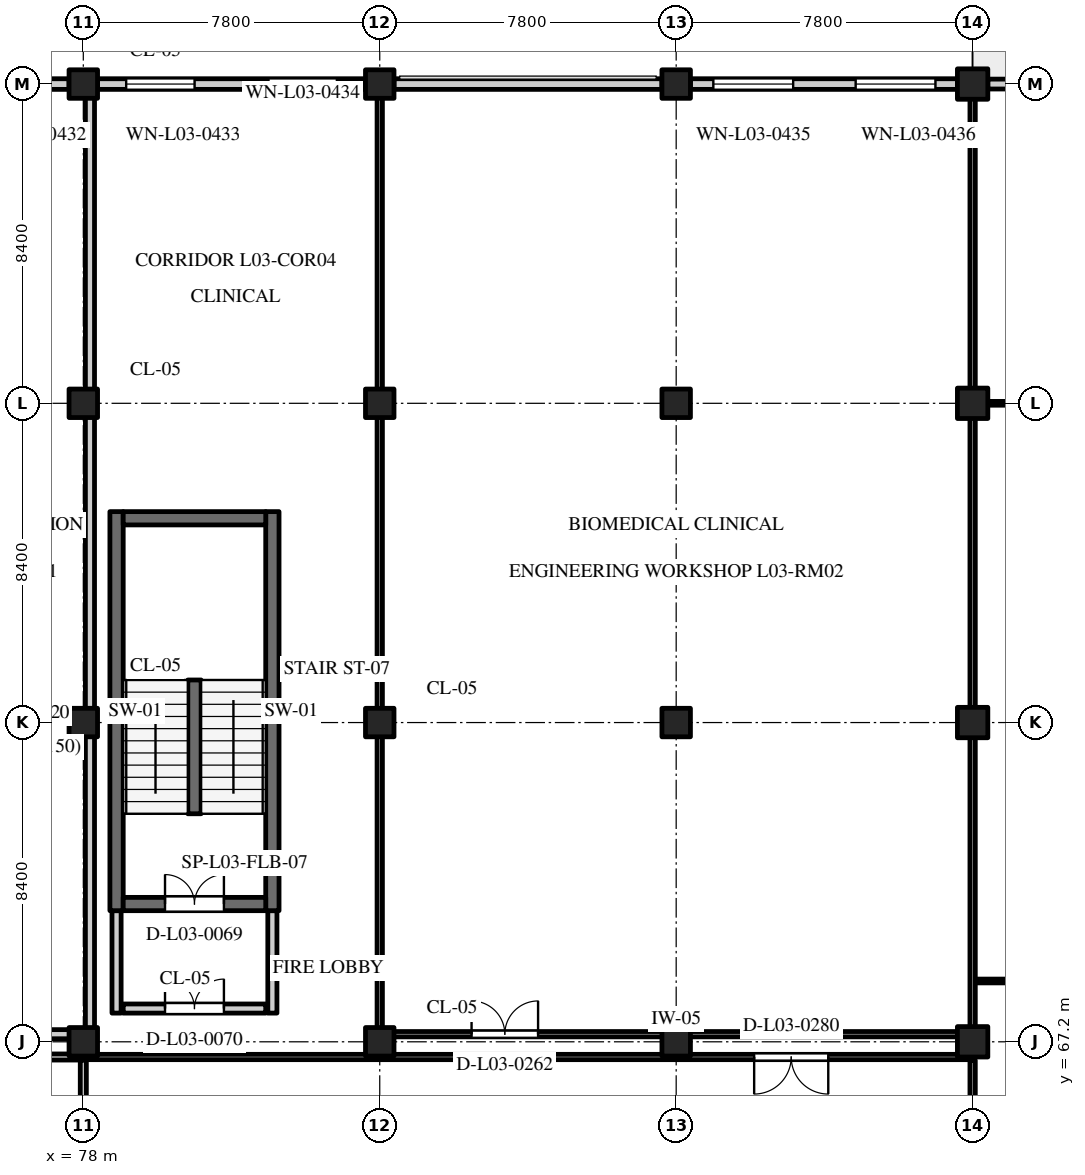
"""IFC4 building model, lengths in metres.
Left out: names, types, materials, properties, quantities, classifications, styles, units other than length and angle.
Written with IfcOpenShell. Run it as: python <this file> out.ifc"""

import sys

from ifc_helpers import new_model, si_unit, direction, frame, frame_2d, origin, origin_2d, place, context, subcontext, project, spatial, rectangle, extrude, element, fill, save


model = new_model("IFC4")
c1 = context("Model", 3, precision=1e-05, world=origin(), true_north=direction((0.0, 1.0)))
c2 = subcontext(c1, "Body", "Model", "MODEL_VIEW")
j1 = project(units=[si_unit("LENGTHUNIT", "METRE"), si_unit("PLANEANGLEUNIT", "RADIAN")], contexts=[c1])
p1 = place(None, origin())
s1 = spatial("IfcSite", under=j1, at=p1, CompositionType="ELEMENT")
p2 = place(p1, origin())
s2 = spatial("IfcBuilding", under=s1, at=p2, CompositionType="ELEMENT")
p3 = place(p2, frame((0.0, 0.0, 14.4)))
s3 = spatial("IfcBuildingStorey", under=s2, at=p3, CompositionType="ELEMENT", Elevation=14.4)
for number, where, z_axis, x_axis in (
    (1, (78.0, 67.2, 0.0), (0.0, 0.0, 1.0), (1.0, 0.0, 0.0)),
    (2, (78.0, 75.6, 0.0), (0.0, 0.0, 1.0), (1.0, 0.0, 0.0)),
    (3, (78.0, 84.0, 0.0), (0.0, 0.0, 1.0), (1.0, 0.0, 0.0)),
    (4, (78.0, 92.4, 0.0), (0.0, 0.0, 1.0), (1.0, 0.0, 0.0)),
    (5, (85.8, 67.2, 0.0), (0.0, 0.0, 1.0), (1.0, 0.0, 0.0)),
    (6, (85.8, 75.6, 0.0), (0.0, 0.0, 1.0), (1.0, 0.0, 0.0)),
    (7, (85.8, 84.0, 0.0), (0.0, 0.0, 1.0), (1.0, 0.0, 0.0)),
    (8, (85.8, 92.4, 0.0), (0.0, 0.0, 1.0), (1.0, 0.0, 0.0)),
    (9, (93.6, 67.2, 0.0), (0.0, 0.0, 1.0), (1.0, 0.0, 0.0)),
    (10, (93.6, 75.6, 0.0), (0.0, 0.0, 1.0), (1.0, 0.0, 0.0)),
    (11, (93.6, 84.0, 0.0), (0.0, 0.0, 1.0), (1.0, 0.0, 0.0)),
    (12, (93.6, 92.4, 0.0), (0.0, 0.0, 1.0), (1.0, 0.0, 0.0)),
):
    element("IfcColumn", number, at=place(p3, frame(where, z_axis=z_axis, x_axis=x_axis)), inside=s3, PredefinedType="COLUMN", context=c2, shape_type="SweptSolid", body=[
        extrude(rectangle(XDim=0.75, YDim=0.75, at=origin_2d()), origin(), (0.0, 0.0, 1.0), 3.6),
    ])
for number, where, z_axis, x_axis in (
    (13, (101.4, 67.2, 0.0), (0.0, 0.0, 1.0), (1.0, 0.0, 0.0)),
    (14, (101.4, 75.6, 0.0), (0.0, 0.0, 1.0), (1.0, 0.0, 0.0)),
    (15, (101.4, 84.0, 0.0), (0.0, 0.0, 1.0), (1.0, 0.0, 0.0)),
    (16, (101.4, 92.4, 0.0), (0.0, 0.0, 1.0), (1.0, 0.0, 0.0)),
):
    element("IfcColumn", number, at=place(p3, frame(where, z_axis=z_axis, x_axis=x_axis)), inside=s3, PredefinedType="COLUMN", context=c2, shape_type="SweptSolid", body=[
        extrude(rectangle(XDim=0.8, YDim=0.8, at=origin_2d()), origin(), (0.0, 0.0, 1.0), 3.6),
    ])
p4 = place(p3, frame((70.575, 92.4, 0.0), z_axis=(0.0, 0.0, 1.0), x_axis=(1.0, 0.0, 0.0)))
e17 = element("IfcWall", 17, at=p4, inside=s3, PredefinedType="STANDARD", context=c2, shape_type="SweptSolid", body=[
    extrude(rectangle(XDim=7.05, YDim=0.28, at=frame_2d((3.525, 0.0))), origin(), (0.0, 0.0, 1.0), 2.72),
])
p5 = place(p4, frame((0.753, 0.0, 0.8)))
e18 = element("IfcOpeningElement", 18, at=p5, cuts=e17, PredefinedType="OPENING", context=c2, shape_type="SweptSolid", body=[
    extrude(rectangle(XDim=1.8, YDim=1.65, at=frame_2d((0.9, 0.825))), frame((0.0, 0.152, 0.0), z_axis=(0.0, -1.0, 0.0), x_axis=(1.0, 0.0, 0.0)), (0.0, 0.0, 1.0), 0.304),
])
p6 = place(p4, frame((4.497, 0.0, 0.8)))
e19 = element("IfcOpeningElement", 19, at=p6, cuts=e17, PredefinedType="OPENING", context=c2, shape_type="SweptSolid", body=[
    extrude(rectangle(XDim=1.8, YDim=1.65, at=frame_2d((0.9, 0.825))), frame((0.0, 0.152, 0.0), z_axis=(0.0, -1.0, 0.0), x_axis=(1.0, 0.0, 0.0)), (0.0, 0.0, 1.0), 0.304),
])
p7 = place(p3, frame((78.375, 92.4, 0.0), z_axis=(0.0, 0.0, 1.0), x_axis=(1.0, 0.0, 0.0)))
e20 = element("IfcWall", 20, at=p7, inside=s3, PredefinedType="STANDARD", context=c2, shape_type="SweptSolid", body=[
    extrude(rectangle(XDim=7.05, YDim=0.28, at=frame_2d((3.525, 0.0))), origin(), (0.0, 0.0, 1.0), 2.72),
])
p8 = place(p7, frame((0.753, 0.0, 0.8)))
e21 = element("IfcOpeningElement", 21, at=p8, cuts=e20, PredefinedType="OPENING", context=c2, shape_type="SweptSolid", body=[
    extrude(rectangle(XDim=1.8, YDim=1.55, at=frame_2d((0.9, 0.775))), frame((0.0, 0.152, 0.0), z_axis=(0.0, -1.0, 0.0), x_axis=(1.0, 0.0, 0.0)), (0.0, 0.0, 1.0), 0.304),
])
p9 = place(p7, frame((4.497, 0.0, 0.8)))
e22 = element("IfcOpeningElement", 22, at=p9, cuts=e20, PredefinedType="OPENING", context=c2, shape_type="SweptSolid", body=[
    extrude(rectangle(XDim=1.8, YDim=1.55, at=frame_2d((0.9, 0.775))), frame((0.0, 0.152, 0.0), z_axis=(0.0, -1.0, 0.0), x_axis=(1.0, 0.0, 0.0)), (0.0, 0.0, 1.0), 0.304),
])
p10 = place(p3, frame((86.175, 92.4, 0.0), z_axis=(0.0, 0.0, 1.0), x_axis=(1.0, 0.0, 0.0)))
e23 = element("IfcWall", 23, at=p10, inside=s3, PredefinedType="STANDARD", context=c2, shape_type="SweptSolid", body=[
    extrude(rectangle(XDim=7.05, YDim=0.28, at=frame_2d((3.525, 0.0))), origin(), (0.0, 0.0, 1.0), 2.72),
])
p11 = place(p3, frame((93.975, 92.4, 0.0), z_axis=(0.0, 0.0, 1.0), x_axis=(1.0, 0.0, 0.0)))
e24 = element("IfcWall", 24, at=p11, inside=s3, PredefinedType="STANDARD", context=c2, shape_type="SweptSolid", body=[
    extrude(rectangle(XDim=7.025, YDim=0.28, at=frame_2d((3.512, 0.0))), origin(), (0.0, 0.0, 1.0), 2.72),
])
p12 = place(p11, frame((0.603, 0.0, 0.8)))
e25 = element("IfcOpeningElement", 25, at=p12, cuts=e24, PredefinedType="OPENING", context=c2, shape_type="SweptSolid", body=[
    extrude(rectangle(XDim=2.1, YDim=1.65, at=frame_2d((1.05, 0.825))), frame((0.0, 0.152, 0.0), z_axis=(0.0, -1.0, 0.0), x_axis=(1.0, 0.0, 0.0)), (0.0, 0.0, 1.0), 0.304),
])
p13 = place(p11, frame((4.347, 0.0, 0.8)))
e26 = element("IfcOpeningElement", 26, at=p13, cuts=e24, PredefinedType="OPENING", context=c2, shape_type="SweptSolid", body=[
    extrude(rectangle(XDim=2.1, YDim=1.65, at=frame_2d((1.05, 0.825))), frame((0.0, 0.152, 0.0), z_axis=(0.0, -1.0, 0.0), x_axis=(1.0, 0.0, 0.0)), (0.0, 0.0, 1.0), 0.304),
])
p14 = place(p3, frame((101.8, 92.4, 0.0), z_axis=(0.0, 0.0, 1.0), x_axis=(1.0, 0.0, 0.0)))
e27 = element("IfcWall", 27, at=p14, inside=s3, PredefinedType="STANDARD", context=c2, shape_type="SweptSolid", body=[
    extrude(rectangle(XDim=7.0, YDim=0.26, at=frame_2d((3.5, 0.0))), origin(), (0.0, 0.0, 1.0), 2.72),
])
p15 = place(p14, frame((0.578, 0.0, 0.8)))
e28 = element("IfcOpeningElement", 28, at=p15, cuts=e27, PredefinedType="OPENING", context=c2, shape_type="SweptSolid", body=[
    extrude(rectangle(XDim=2.1, YDim=1.55, at=frame_2d((1.05, 0.775))), frame((0.0, 0.142, 0.0), z_axis=(0.0, -1.0, 0.0), x_axis=(1.0, 0.0, 0.0)), (0.0, 0.0, 1.0), 0.284),
])
p16 = place(p14, frame((4.322, 0.0, 0.8)))
e29 = element("IfcOpeningElement", 29, at=p16, cuts=e27, PredefinedType="OPENING", context=c2, shape_type="SweptSolid", body=[
    extrude(rectangle(XDim=2.1, YDim=1.55, at=frame_2d((1.05, 0.775))), frame((0.0, 0.142, 0.0), z_axis=(0.0, -1.0, 0.0), x_axis=(1.0, 0.0, 0.0)), (0.0, 0.0, 1.0), 0.284),
])
for number, where, z_axis, x_axis in (
    (30, (78.875, 70.65, 0.0), (0.0, 0.0, 1.0), (0.0, 1.0, 0.0)),
    (31, (82.975, 70.65, 0.0), (0.0, 0.0, 1.0), (0.0, 1.0, 0.0)),
):
    element("IfcWall", number, at=place(p3, frame(where, z_axis=z_axis, x_axis=x_axis)), inside=s3, PredefinedType="SHEAR", context=c2, shape_type="SweptSolid", body=[
        extrude(rectangle(XDim=10.5, YDim=0.35, at=frame_2d((5.25, 0.0))), origin(), (0.0, 0.0, 1.0), 3.6),
    ])
p17 = place(p3, frame((79.05, 80.975, 0.0), z_axis=(0.0, 0.0, 1.0), x_axis=(1.0, 0.0, 0.0)))
e32 = element("IfcWall", 32, at=p17, inside=s3, PredefinedType="SHEAR", context=c2, shape_type="SweptSolid", body=[
    extrude(rectangle(XDim=3.75, YDim=0.35, at=frame_2d((1.875, 0.0))), origin(), (0.0, 0.0, 1.0), 3.6),
])
p18 = place(p3, frame((79.05, 70.825, 0.0), z_axis=(0.0, 0.0, 1.0), x_axis=(1.0, 0.0, 0.0)))
e33 = element("IfcWall", 33, at=p18, inside=s3, PredefinedType="SHEAR", context=c2, shape_type="SweptSolid", body=[
    extrude(rectangle(XDim=3.75, YDim=0.35, at=frame_2d((1.875, 0.0))), origin(), (0.0, 0.0, 1.0), 3.27),
])
p19 = place(p18, frame((1.1, 0.0, 0.0)))
e34 = element("IfcOpeningElement", 34, at=p19, cuts=e33, PredefinedType="OPENING", context=c2, shape_type="SweptSolid", body=[
    extrude(rectangle(XDim=1.55, YDim=2.25, at=frame_2d((0.775, 1.125))), frame((0.0, 0.187, 0.0), z_axis=(0.0, -1.0, 0.0), x_axis=(1.0, 0.0, 0.0)), (0.0, 0.0, 1.0), 0.374),
])
for number, where, z_axis, x_axis in (
    (35, (78.875, 67.955, 0.0), (0.0, 0.0, 1.0), (0.0, 1.0, 0.0)),
    (36, (82.975, 67.955, 0.0), (0.0, 0.0, 1.0), (0.0, 1.0, 0.0)),
):
    element("IfcWall", number, at=place(p3, frame(where, z_axis=z_axis, x_axis=x_axis)), inside=s3, PredefinedType="STANDARD", context=c2, shape_type="SweptSolid", body=[
        extrude(rectangle(XDim=2.695, YDim=0.24, at=frame_2d((1.347, 0.0))), origin(), (0.0, 0.0, 1.0), 3.27),
    ])
p20 = place(p3, frame((79.05, 68.075, 0.0), z_axis=(0.0, 0.0, 1.0), x_axis=(1.0, 0.0, 0.0)))
e37 = element("IfcWall", 37, at=p20, inside=s3, PredefinedType="STANDARD", context=c2, shape_type="SweptSolid", body=[
    extrude(rectangle(XDim=3.75, YDim=0.24, at=frame_2d((1.875, 0.0))), origin(), (0.0, 0.0, 1.0), 3.27),
])
p21 = place(p20, frame((1.1, 0.0, 0.0)))
e38 = element("IfcOpeningElement", 38, at=p21, cuts=e37, PredefinedType="OPENING", context=c2, shape_type="SweptSolid", body=[
    extrude(rectangle(XDim=1.55, YDim=2.25, at=frame_2d((0.775, 1.125))), frame((0.0, 0.132, 0.0), z_axis=(0.0, -1.0, 0.0), x_axis=(1.0, 0.0, 0.0)), (0.0, 0.0, 1.0), 0.264),
])
p22 = place(p3, frame((80.925, 73.2, 0.0), z_axis=(0.0, 0.0, 1.0), x_axis=(0.0, 1.0, 0.0)))
e39 = element("IfcWall", 39, at=p22, inside=s3, PredefinedType="SHEAR", context=c2, shape_type="SweptSolid", body=[
    extrude(rectangle(XDim=3.52, YDim=0.35, at=frame_2d((1.76, 0.0))), origin(), (0.0, 0.0, 1.0), 3.6),
])
p23 = place(p3, frame((70.51, 67.4, 0.0), z_axis=(0.0, 0.0, 1.0), x_axis=(1.0, 0.0, 0.0)))
e40 = element("IfcWall", 40, at=p23, inside=s3, PredefinedType="STANDARD", context=c2, shape_type="SweptSolid", body=[
    extrude(rectangle(XDim=7.555, YDim=0.24, at=frame_2d((3.777, 0.0))), origin(), (0.0, 0.0, 1.0), 3.25),
])
p24 = place(p23, frame((1.939, 0.0, 0.0)))
e41 = element("IfcOpeningElement", 41, at=p24, cuts=e40, PredefinedType="OPENING", context=c2, shape_type="SweptSolid", body=[
    extrude(rectangle(XDim=1.65, YDim=2.25, at=frame_2d((0.825, 1.125))), frame((0.0, 0.132, 0.0), z_axis=(0.0, -1.0, 0.0), x_axis=(1.0, 0.0, 0.0)), (0.0, 0.0, 1.0), 0.264),
])
p25 = place(p3, frame((78.175, 67.51, 0.0), z_axis=(0.0, 0.0, 1.0), x_axis=(0.0, 1.0, 0.0)))
e42 = element("IfcWall", 42, at=p25, inside=s3, PredefinedType="STANDARD", context=c2, shape_type="SweptSolid", body=[
    extrude(rectangle(XDim=24.78, YDim=0.24, at=frame_2d((12.39, 0.0))), origin(), (0.0, 0.0, 1.0), 2.62),
])
p26 = place(p3, frame((85.885, 67.4, 0.0), z_axis=(0.0, 0.0, 1.0), x_axis=(1.0, 0.0, 0.0)))
e43 = element("IfcWall", 43, at=p26, inside=s3, PredefinedType="PARTITIONING", context=c2, shape_type="SweptSolid", body=[
    extrude(rectangle(XDim=15.43, YDim=0.14, at=frame_2d((7.715, 0.0))), origin(), (0.0, 0.0, 1.0), 3.25),
])
p27 = place(p26, frame((2.331, 0.0, 0.0)))
e44 = element("IfcOpeningElement", 44, at=p27, cuts=e43, PredefinedType="OPENING", context=c2, shape_type="SweptSolid", body=[
    extrude(rectangle(XDim=1.75, YDim=2.3, at=frame_2d((0.875, 1.15))), frame((0.0, 0.082, 0.0), z_axis=(0.0, -1.0, 0.0), x_axis=(1.0, 0.0, 0.0)), (0.0, 0.0, 1.0), 0.164),
])
p28 = place(p3, frame((93.265, 92.4, 0.0), z_axis=(0.0, 0.0, 1.0), x_axis=(1.0, 0.0, 0.0)))
e45 = element("IfcWall", 45, at=p28, inside=s3, PredefinedType="PARTITIONING", context=c2, shape_type="SweptSolid", body=[
    extrude(rectangle(XDim=0.67, YDim=0.14, at=frame_2d((0.335, 0.0))), origin(), (0.0, 0.0, 1.0), 2.62),
])
p29 = place(p3, frame((85.8, 67.485, 0.0), z_axis=(0.0, 0.0, 1.0), x_axis=(0.0, 1.0, 0.0)))
e46 = element("IfcWall", 46, at=p29, inside=s3, PredefinedType="PARTITIONING", context=c2, shape_type="SweptSolid", body=[
    extrude(rectangle(XDim=24.83, YDim=0.14, at=frame_2d((12.415, 0.0))), origin(), (0.0, 0.0, 1.0), 3.25),
])
p30 = place(p3, frame((101.4, 67.485, 0.0), z_axis=(0.0, 0.0, 1.0), x_axis=(0.0, 1.0, 0.0)))
e47 = element("IfcWall", 47, at=p30, inside=s3, PredefinedType="PARTITIONING", context=c2, shape_type="SweptSolid", body=[
    extrude(rectangle(XDim=24.83, YDim=0.14, at=frame_2d((12.415, 0.0))), origin(), (0.0, 0.0, 1.0), 2.62),
])
p31 = place(p3, frame((62.135, 66.8, 0.0), z_axis=(0.0, 0.0, 1.0), x_axis=(1.0, 0.0, 0.0)))
e48 = element("IfcWall", 48, at=p31, inside=s3, PredefinedType="PARTITIONING", context=c2, shape_type="SweptSolid", body=[
    extrude(rectangle(XDim=15.78, YDim=0.16, at=frame_2d((7.89, 0.0))), origin(), (0.0, 0.0, 1.0), 3.25),
])
p32 = place(p31, frame((11.958, 0.0, 0.0)))
e49 = element("IfcOpeningElement", 49, at=p32, cuts=e48, PredefinedType="OPENING", context=c2, shape_type="SweptSolid", body=[
    extrude(rectangle(XDim=1.85, YDim=2.3, at=frame_2d((0.925, 1.15))), frame((0.0, 0.092, 0.0), z_axis=(0.0, -1.0, 0.0), x_axis=(1.0, 0.0, 0.0)), (0.0, 0.0, 1.0), 0.184),
])
p33 = place(p3, frame((78.0, 58.885, 0.0), z_axis=(0.0, 0.0, 1.0), x_axis=(0.0, 1.0, 0.0)))
e50 = element("IfcWall", 50, at=p33, inside=s3, PredefinedType="PARTITIONING", context=c2, shape_type="SweptSolid", body=[
    extrude(rectangle(XDim=7.83, YDim=0.16, at=frame_2d((3.915, 0.0))), origin(), (0.0, 0.0, 1.0), 2.62),
])
p34 = place(p3, frame((78.085, 66.8, 0.0), z_axis=(0.0, 0.0, 1.0), x_axis=(1.0, 0.0, 0.0)))
e51 = element("IfcWall", 51, at=p34, inside=s3, PredefinedType="PARTITIONING", context=c2, shape_type="SweptSolid", body=[
    extrude(rectangle(XDim=23.23, YDim=0.14, at=frame_2d((11.615, 0.0))), origin(), (0.0, 0.0, 1.0), 3.25),
])
p35 = place(p34, frame((17.567, 0.0, 0.0)))
e52 = element("IfcOpeningElement", 52, at=p35, cuts=e51, PredefinedType="OPENING", context=c2, shape_type="SweptSolid", body=[
    extrude(rectangle(XDim=1.95, YDim=2.35, at=frame_2d((0.975, 1.175))), frame((0.0, 0.082, 0.0), z_axis=(0.0, -1.0, 0.0), x_axis=(1.0, 0.0, 0.0)), (0.0, 0.0, 1.0), 0.164),
])
p36 = place(p3, frame((101.4, 58.885, 0.0), z_axis=(0.0, 0.0, 1.0), x_axis=(0.0, 1.0, 0.0)))
e53 = element("IfcWall", 53, at=p36, inside=s3, PredefinedType="PARTITIONING", context=c2, shape_type="SweptSolid", body=[
    extrude(rectangle(XDim=7.83, YDim=0.14, at=frame_2d((3.915, 0.0))), origin(), (0.0, 0.0, 1.0), 2.62),
])
p37 = place(p3, frame((101.485, 68.8, 0.0), z_axis=(0.0, 0.0, 1.0), x_axis=(1.0, 0.0, 0.0)))
e54 = element("IfcWall", 54, at=p37, inside=s3, PredefinedType="PARTITIONING", context=c2, shape_type="SweptSolid", body=[
    extrude(rectangle(XDim=23.23, YDim=0.1, at=frame_2d((11.615, 0.0))), origin(), (0.0, 0.0, 1.0), 3.25),
])
p38 = place(p37, frame((1.994, 0.0, 0.0)))
e55 = element("IfcOpeningElement", 55, at=p38, cuts=e54, PredefinedType="OPENING", context=c2, shape_type="SweptSolid", body=[
    extrude(rectangle(XDim=1.2, YDim=2.15, at=frame_2d((0.6, 1.075))), frame((0.0, 0.062, 0.0), z_axis=(0.0, -1.0, 0.0), x_axis=(1.0, 0.0, 0.0)), (0.0, 0.0, 1.0), 0.124),
])
p39 = place(p3, frame((101.485, 84.0, 0.0), z_axis=(0.0, 0.0, 1.0), x_axis=(1.0, 0.0, 0.0)))
e56 = element("IfcWall", 56, at=p39, inside=s3, PredefinedType="PARTITIONING", context=c2, shape_type="SweptSolid", body=[
    extrude(rectangle(XDim=23.23, YDim=0.1, at=frame_2d((11.615, 0.0))), origin(), (0.0, 0.0, 1.0), 2.62),
])
p40 = place(p8, origin())
e57 = element("IfcWindow", 57, at=p40, inside=s3, PartitioningType="DOUBLE_PANEL_VERTICAL", PredefinedType="WINDOW", context=c2, shape_type="SweptSolid", body=[
    extrude(rectangle(XDim=1.8, YDim=1.55, at=frame_2d((0.9, 0.775))), frame((0.0, 0.03, 0.0), z_axis=(0.0, -1.0, 0.0), x_axis=(1.0, 0.0, 0.0)), (0.0, 0.0, 1.0), 0.06),
])
fill(e21, e57)
p41 = place(p9, origin())
e58 = element("IfcWindow", 58, at=p41, inside=s3, PartitioningType="DOUBLE_PANEL_VERTICAL", PredefinedType="WINDOW", context=c2, shape_type="SweptSolid", body=[
    extrude(rectangle(XDim=1.8, YDim=1.55, at=frame_2d((0.9, 0.775))), frame((0.0, 0.03, 0.0), z_axis=(0.0, -1.0, 0.0), x_axis=(1.0, 0.0, 0.0)), (0.0, 0.0, 1.0), 0.06),
])
fill(e22, e58)
p42 = place(p12, origin())
e59 = element("IfcWindow", 59, at=p42, inside=s3, PartitioningType="DOUBLE_PANEL_VERTICAL", PredefinedType="WINDOW", context=c2, shape_type="SweptSolid", body=[
    extrude(rectangle(XDim=2.1, YDim=1.65, at=frame_2d((1.05, 0.825))), frame((0.0, 0.03, 0.0), z_axis=(0.0, -1.0, 0.0), x_axis=(1.0, 0.0, 0.0)), (0.0, 0.0, 1.0), 0.06),
])
fill(e25, e59)
p43 = place(p13, origin())
e60 = element("IfcWindow", 60, at=p43, inside=s3, PartitioningType="DOUBLE_PANEL_VERTICAL", PredefinedType="WINDOW", context=c2, shape_type="SweptSolid", body=[
    extrude(rectangle(XDim=2.1, YDim=1.65, at=frame_2d((1.05, 0.825))), frame((0.0, 0.03, 0.0), z_axis=(0.0, -1.0, 0.0), x_axis=(1.0, 0.0, 0.0)), (0.0, 0.0, 1.0), 0.06),
])
fill(e26, e60)
p44 = place(p19, origin())
e61 = element("IfcDoor", 61, at=p44, inside=s3, OperationType="DOUBLE_DOOR_SINGLE_SWING", PredefinedType="DOOR", context=c2, shape_type="SweptSolid", body=[
    extrude(rectangle(XDim=1.55, YDim=2.25, at=frame_2d((0.775, 1.125))), frame((0.0, 0.025, 0.0), z_axis=(0.0, -1.0, 0.0), x_axis=(1.0, 0.0, 0.0)), (0.0, 0.0, 1.0), 0.05),
])
fill(e34, e61)
p45 = place(p21, origin())
e62 = element("IfcDoor", 62, at=p45, inside=s3, OperationType="DOUBLE_DOOR_SINGLE_SWING", PredefinedType="DOOR", context=c2, shape_type="SweptSolid", body=[
    extrude(rectangle(XDim=1.55, YDim=2.25, at=frame_2d((0.775, 1.125))), frame((0.0, 0.025, 0.0), z_axis=(0.0, -1.0, 0.0), x_axis=(1.0, 0.0, 0.0)), (0.0, 0.0, 1.0), 0.05),
])
fill(e38, e62)
p46 = place(p27, origin())
e63 = element("IfcDoor", 63, at=p46, inside=s3, OperationType="DOUBLE_DOOR_SINGLE_SWING", PredefinedType="DOOR", context=c2, shape_type="SweptSolid", body=[
    extrude(rectangle(XDim=1.75, YDim=2.3, at=frame_2d((0.875, 1.15))), frame((0.0, 0.025, 0.0), z_axis=(0.0, -1.0, 0.0), x_axis=(1.0, 0.0, 0.0)), (0.0, 0.0, 1.0), 0.05),
])
fill(e44, e63)
p47 = place(p35, frame((1.95, 0.0, 0.0), z_axis=(0.0, 0.0, 1.0), x_axis=(-1.0, 0.0, 0.0)))
e64 = element("IfcDoor", 64, at=p47, inside=s3, OperationType="DOUBLE_DOOR_SINGLE_SWING", PredefinedType="DOOR", context=c2, shape_type="SweptSolid", body=[
    extrude(rectangle(XDim=1.95, YDim=2.35, at=frame_2d((0.975, 1.175))), frame((0.0, 0.025, 0.0), z_axis=(0.0, -1.0, 0.0), x_axis=(1.0, 0.0, 0.0)), (0.0, 0.0, 1.0), 0.05),
])
fill(e52, e64)
save(model, sys.argv[1])
